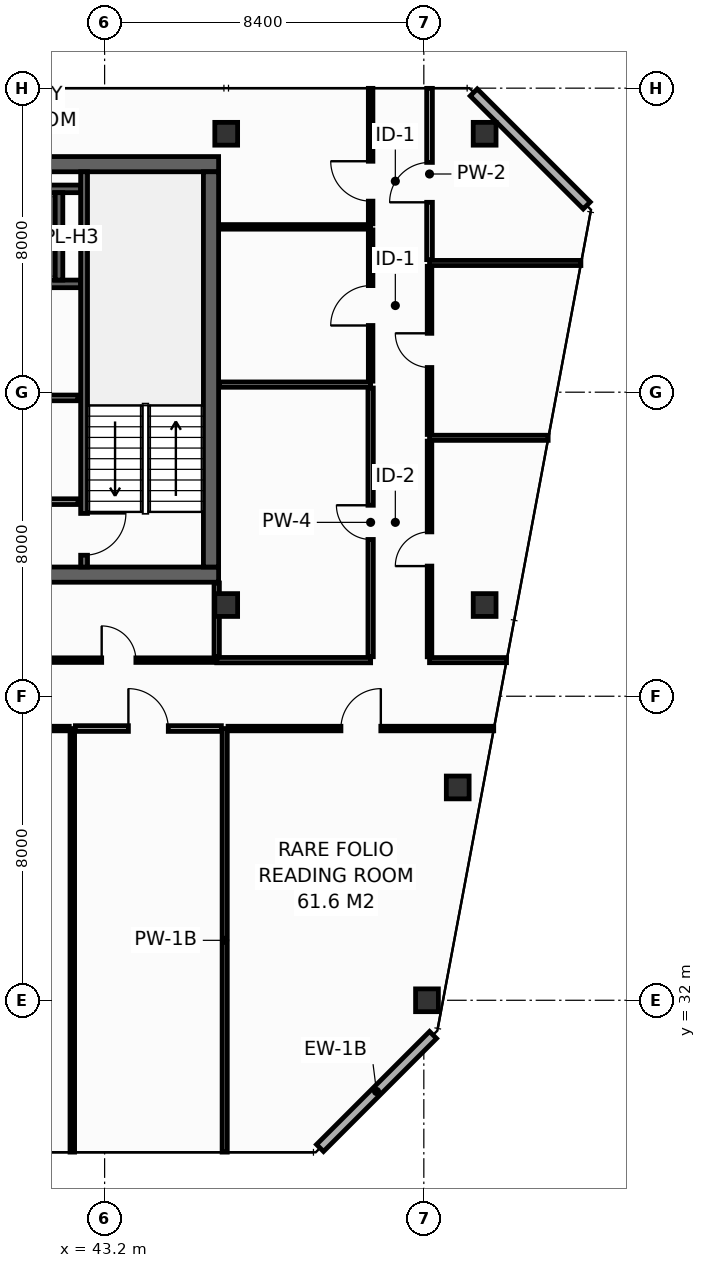
"""IFC4 building model, lengths in metres.
Left out: names, types, materials, properties, quantities, classifications, styles, units other than length and angle.
Written with IfcOpenShell. Run it as: python <this file> out.ifc"""

import sys

from ifc_helpers import new_model, si_unit, direction, frame, frame_2d, origin, origin_2d, place, context, subcontext, project, spatial, rectangle, hollow_rectangle, extrude, element, fill, save


model = new_model("IFC4")
c1 = context("Model", 3, precision=1e-05, world=origin(), true_north=direction((0.0, 1.0)))
c2 = subcontext(c1, "Body", "Model", "MODEL_VIEW")
j1 = project(units=[si_unit("LENGTHUNIT", "METRE"), si_unit("PLANEANGLEUNIT", "RADIAN")], contexts=[c1])
p1 = place(None, origin())
s1 = spatial("IfcSite", under=j1, at=p1, CompositionType="ELEMENT")
p2 = place(p1, origin())
s2 = spatial("IfcBuilding", under=s1, at=p2, CompositionType="ELEMENT")
p3 = place(p2, frame((0.0, 0.0, 280.0)))
s3 = spatial("IfcBuildingStorey", under=s2, at=p3, CompositionType="ELEMENT", Elevation=280.0)
p4 = place(p3, frame((13.7, 43.2, 0.0), z_axis=(0.0, 0.0, 1.0), x_axis=(1.0, 0.0, 0.0)))
e1 = element("IfcWall", 1, at=p4, inside=s3, PredefinedType="SHEAR", context=c2, shape_type="SweptSolid", body=[
    extrude(rectangle(XDim=32.5, YDim=0.4, at=frame_2d((16.25, 0.0))), origin(), (0.0, 0.0, 1.0), 3.55),
])
p5 = place(p4, frame((5.4, 0.0, 0.0)))
e2 = element("IfcOpeningElement", 2, at=p5, cuts=e1, PredefinedType="OPENING", context=c2, shape_type="SweptSolid", body=[
    extrude(rectangle(XDim=1.1, YDim=2.15, at=frame_2d((0.55, 1.075))), frame((0.0, 0.21, 0.0), z_axis=(0.0, -1.0, 0.0), x_axis=(1.0, 0.0, 0.0)), (0.0, 0.0, 1.0), 0.42),
])
p6 = place(p4, frame((25.6, 0.0, 0.0)))
e3 = element("IfcOpeningElement", 3, at=p6, cuts=e1, PredefinedType="OPENING", context=c2, shape_type="SweptSolid", body=[
    extrude(rectangle(XDim=1.1, YDim=2.15, at=frame_2d((0.55, 1.075))), frame((0.0, 0.21, 0.0), z_axis=(0.0, -1.0, 0.0), x_axis=(1.0, 0.0, 0.0)), (0.0, 0.0, 1.0), 0.42),
])
p7 = place(p3, frame((13.7, 54.0, 0.0), z_axis=(0.0, 0.0, 1.0), x_axis=(1.0, 0.0, 0.0)))
e4 = element("IfcWall", 4, at=p7, inside=s3, PredefinedType="SHEAR", context=c2, shape_type="SweptSolid", body=[
    extrude(rectangle(XDim=32.5, YDim=0.4, at=frame_2d((16.25, 0.0))), origin(), (0.0, 0.0, 1.0), 3.55),
])
p8 = place(p3, frame((46.0, 43.4, 0.0), z_axis=(0.0, 0.0, 1.0), x_axis=(0.0, 1.0, 0.0)))
e5 = element("IfcWall", 5, at=p8, inside=s3, PredefinedType="SHEAR", context=c2, shape_type="SweptSolid", body=[
    extrude(rectangle(XDim=10.4, YDim=0.4, at=frame_2d((5.2, 0.0))), origin(), (0.0, 0.0, 1.0), 3.55),
])
for number, where, z_axis, x_axis in (
    (6, (46.4, 54.8, 0.0), (0.0, 0.0, 1.0), (1.0, 0.0, 0.0)),
    (7, (53.2, 54.8, 0.0), (0.0, 0.0, 1.0), (1.0, 0.0, 0.0)),
    (8, (46.4, 42.4, 0.0), (0.0, 0.0, 1.0), (1.0, 0.0, 0.0)),
    (9, (53.2, 42.4, 0.0), (0.0, 0.0, 1.0), (1.0, 0.0, 0.0)),
    (10, (51.683, 32.0, 0.0), (0.0, 0.0, 1.0), (1.0, 0.0, 0.0)),
    (11, (52.492, 37.6, 0.0), (0.0, 0.0, 1.0), (1.0, 0.0, 0.0)),
):
    element("IfcColumn", number, at=place(p3, frame(where, z_axis=z_axis, x_axis=x_axis)), inside=s3, PredefinedType="COLUMN", context=c2, shape_type="SweptSolid", body=[
        extrude(hollow_rectangle(XDim=0.6, YDim=0.6, WallThickness=0.028, at=origin_2d()), origin(), (0.0, 0.0, 1.0), 3.8),
    ])
p9 = place(p3, frame((39.525, 50.85, 0.0), z_axis=(0.0, 0.0, 1.0), x_axis=(1.0, 0.0, 0.0)))
e12 = element("IfcWall", 12, at=p9, inside=s3, PredefinedType="SHEAR", context=c2, shape_type="SweptSolid", body=[
    extrude(rectangle(XDim=3.045, YDim=0.2, at=frame_2d((1.522, 0.0))), origin(), (0.0, 0.0, 1.0), 3.55),
])
p10 = place(p9, frame((0.825, 0.0, 0.0)))
e13 = element("IfcOpeningElement", 13, at=p10, cuts=e12, PredefinedType="OPENING", context=c2, shape_type="SweptSolid", body=[
    extrude(rectangle(XDim=1.1, YDim=2.2, at=frame_2d((0.55, 1.1))), frame((0.0, 0.11, 0.0), z_axis=(0.0, -1.0, 0.0), x_axis=(1.0, 0.0, 0.0)), (0.0, 0.0, 1.0), 0.22),
])
p11 = place(p3, frame((39.525, 53.35, 0.0), z_axis=(0.0, 0.0, 1.0), x_axis=(1.0, 0.0, 0.0)))
e14 = element("IfcWall", 14, at=p11, inside=s3, PredefinedType="SHEAR", context=c2, shape_type="SweptSolid", body=[
    extrude(rectangle(XDim=3.045, YDim=0.2, at=frame_2d((1.522, 0.0))), origin(), (0.0, 0.0, 1.0), 3.55),
])
p12 = place(p3, frame((42.0, 50.95, 0.0), z_axis=(0.0, 0.0, 1.0), x_axis=(0.0, 1.0, 0.0)))
e15 = element("IfcWall", 15, at=p12, inside=s3, PredefinedType="SHEAR", context=c2, shape_type="SweptSolid", body=[
    extrude(rectangle(XDim=2.3, YDim=0.2, at=frame_2d((1.15, 0.0))), origin(), (0.0, 0.0, 1.0), 3.55),
])
p13 = place(p3, frame((42.66, 53.8, 0.0), z_axis=(0.0, 0.0, 1.0), x_axis=(0.0, -1.0, 0.0)))
e16 = element("IfcWall", 16, at=p13, inside=s3, PredefinedType="SHEAR", context=c2, shape_type="SweptSolid", body=[
    extrude(rectangle(XDim=10.4, YDim=0.18, at=frame_2d((5.2, 0.0))), origin(), (0.0, 0.0, 1.0), 3.55),
])
p14 = place(p13, frame((8.99, 0.0, 0.0)))
e17 = element("IfcOpeningElement", 17, at=p14, cuts=e16, PredefinedType="OPENING", context=c2, shape_type="SweptSolid", body=[
    extrude(rectangle(XDim=1.1, YDim=2.15, at=frame_2d((0.55, 1.075))), frame((0.0, 0.1, 0.0), z_axis=(0.0, -1.0, 0.0), x_axis=(1.0, 0.0, 0.0)), (0.0, 0.0, 1.0), 0.2),
])
p15 = place(p3, frame((34.05, 45.12, 0.0), z_axis=(0.0, 0.0, 1.0), x_axis=(1.0, 0.0, 0.0)))
e18 = element("IfcWall", 18, at=p15, inside=s3, PredefinedType="PARTITIONING", context=c2, shape_type="SweptSolid", body=[
    extrude(rectangle(XDim=8.45, YDim=0.15, at=frame_2d((4.225, 0.0))), origin(), (0.0, 0.0, 1.0), 3.55),
])
p16 = place(p15, frame((1.5, 0.0, 0.0)))
e19 = element("IfcOpeningElement", 19, at=p16, cuts=e18, PredefinedType="OPENING", context=c2, shape_type="SweptSolid", body=[
    extrude(rectangle(XDim=0.95, YDim=2.15, at=frame_2d((0.475, 1.075))), frame((0.0, 0.085, 0.0), z_axis=(0.0, -1.0, 0.0), x_axis=(1.0, 0.0, 0.0)), (0.0, 0.0, 1.0), 0.17),
])
p17 = place(p15, frame((5.8, 0.0, 0.0)))
e20 = element("IfcOpeningElement", 20, at=p17, cuts=e18, PredefinedType="OPENING", context=c2, shape_type="SweptSolid", body=[
    extrude(rectangle(XDim=0.95, YDim=2.15, at=frame_2d((0.475, 1.075))), frame((0.0, 0.085, 0.0), z_axis=(0.0, -1.0, 0.0), x_axis=(1.0, 0.0, 0.0)), (0.0, 0.0, 1.0), 0.17),
])
p18 = place(p3, frame((34.05, 47.85, 0.0), z_axis=(0.0, 0.0, 1.0), x_axis=(1.0, 0.0, 0.0)))
e21 = element("IfcWall", 21, at=p18, inside=s3, PredefinedType="PARTITIONING", context=c2, shape_type="SweptSolid", body=[
    extrude(rectangle(XDim=8.45, YDim=0.15, at=frame_2d((4.225, 0.0))), origin(), (0.0, 0.0, 1.0), 3.55),
])
for number, where, z_axis, x_axis in (
    (22, (48.869, 28.113, 0.0), (0.0, 0.0, 1.0), (0.707, 0.707, 0.0)),
    (23, (55.887, 52.913, 0.0), (0.0, 0.0, 1.0), (-0.707, 0.707, 0.0)),
):
    element("IfcWall", number, at=place(p3, frame(where, z_axis=z_axis, x_axis=x_axis)), inside=s3, PredefinedType="STANDARD", context=c2, shape_type="SweptSolid", body=[
        extrude(rectangle(XDim=4.206, YDim=0.26, at=frame_2d((2.103, 0.0))), origin(), (0.0, 0.0, 1.0), 3.55),
    ])
p19 = place(p3, frame((46.15, 40.95, 0.0), z_axis=(0.0, 0.0, 1.0), x_axis=(1.0, 0.0, 0.0)))
e24 = element("IfcWall", 24, at=p19, inside=s3, PredefinedType="PARTITIONING", context=c2, shape_type="SweptSolid", body=[
    extrude(rectangle(XDim=4.05, YDim=0.14, at=frame_2d((2.025, 0.0))), origin(), (0.0, 0.0, 1.0), 3.55),
])
p20 = place(p3, frame((46.15, 41.04, 0.0), z_axis=(0.0, 0.0, 1.0), x_axis=(0.0, 1.0, 0.0)))
e25 = element("IfcWall", 25, at=p20, inside=s3, PredefinedType="PARTITIONING", context=c2, shape_type="SweptSolid", body=[
    extrude(rectangle(XDim=1.94, YDim=0.14, at=frame_2d((0.97, 0.0))), origin(), (0.0, 0.0, 1.0), 3.55),
])
p21 = place(p3, frame((46.22, 48.2, 0.0), z_axis=(0.0, 0.0, 1.0), x_axis=(1.0, 0.0, 0.0)))
e26 = element("IfcWall", 26, at=p21, inside=s3, PredefinedType="PARTITIONING", context=c2, shape_type="SweptSolid", body=[
    extrude(rectangle(XDim=3.98, YDim=0.14, at=frame_2d((1.99, 0.0))), origin(), (0.0, 0.0, 1.0), 3.55),
])
p22 = place(p3, frame((50.2, 41.04, 0.0), z_axis=(0.0, 0.0, 1.0), x_axis=(0.0, 1.0, 0.0)))
e27 = element("IfcWall", 27, at=p22, inside=s3, PredefinedType="PARTITIONING", context=c2, shape_type="SweptSolid", body=[
    extrude(rectangle(XDim=7.07, YDim=0.14, at=frame_2d((3.535, 0.0))), origin(), (0.0, 0.0, 1.0), 2.947),
])
p23 = place(p22, frame((3.085, 0.0, 0.0)))
e28 = element("IfcOpeningElement", 28, at=p23, cuts=e27, PredefinedType="OPENING", context=c2, shape_type="SweptSolid", body=[
    extrude(rectangle(XDim=0.9, YDim=2.1, at=frame_2d((0.45, 1.05))), frame((0.0, 0.08, 0.0), z_axis=(0.0, -1.0, 0.0), x_axis=(1.0, 0.0, 0.0)), (0.0, 0.0, 1.0), 0.16),
])
p24 = place(p3, frame((46.22, 52.35, 0.0), z_axis=(0.0, 0.0, 1.0), x_axis=(1.0, 0.0, 0.0)))
e29 = element("IfcWall", 29, at=p24, inside=s3, PredefinedType="PARTITIONING", context=c2, shape_type="SweptSolid", body=[
    extrude(rectangle(XDim=3.98, YDim=0.12, at=frame_2d((1.99, 0.0))), origin(), (0.0, 0.0, 1.0), 3.55),
])
p25 = place(p3, frame((50.2, 48.29, 0.0), z_axis=(0.0, 0.0, 1.0), x_axis=(0.0, 1.0, 0.0)))
e30 = element("IfcWall", 30, at=p25, inside=s3, PredefinedType="PARTITIONING", context=c2, shape_type="SweptSolid", body=[
    extrude(rectangle(XDim=3.98, YDim=0.12, at=frame_2d((1.99, 0.0))), origin(), (0.0, 0.0, 1.0), 3.55),
])
p26 = place(p25, frame((1.465, 0.0, 0.0)))
e31 = element("IfcOpeningElement", 31, at=p26, cuts=e30, PredefinedType="OPENING", context=c2, shape_type="SweptSolid", body=[
    extrude(rectangle(XDim=1.05, YDim=2.15, at=frame_2d((0.525, 1.075))), frame((0.0, 0.07, 0.0), z_axis=(0.0, -1.0, 0.0), x_axis=(1.0, 0.0, 0.0)), (0.0, 0.0, 1.0), 0.14),
])
p27 = place(p3, frame((50.2, 52.43, 0.0), z_axis=(0.0, 0.0, 1.0), x_axis=(0.0, 1.0, 0.0)))
e32 = element("IfcWall", 32, at=p27, inside=s3, PredefinedType="PARTITIONING", context=c2, shape_type="SweptSolid", body=[
    extrude(rectangle(XDim=3.565, YDim=0.12, at=frame_2d((1.783, 0.0))), origin(), (0.0, 0.0, 1.0), 2.935),
])
p28 = place(p27, frame((0.597, 0.0, 0.0)))
e33 = element("IfcOpeningElement", 33, at=p28, cuts=e32, PredefinedType="OPENING", context=c2, shape_type="SweptSolid", body=[
    extrude(rectangle(XDim=1.05, YDim=2.15, at=frame_2d((0.525, 1.075))), frame((0.0, 0.07, 0.0), z_axis=(0.0, -1.0, 0.0), x_axis=(1.0, 0.0, 0.0)), (0.0, 0.0, 1.0), 0.14),
])
p29 = place(p3, frame((51.75, 40.95, 0.0), z_axis=(0.0, 0.0, 1.0), x_axis=(1.0, 0.0, 0.0)))
e34 = element("IfcWall", 34, at=p29, inside=s3, PredefinedType="PARTITIONING", context=c2, shape_type="SweptSolid", body=[
    extrude(rectangle(XDim=2.026, YDim=0.135, at=frame_2d((1.013, 0.0))), origin(), (0.0, 0.0, 1.0), 3.085),
])
p30 = place(p3, frame((51.75, 46.8, 0.0), z_axis=(0.0, 0.0, 1.0), x_axis=(1.0, 0.0, 0.0)))
e35 = element("IfcWall", 35, at=p30, inside=s3, PredefinedType="PARTITIONING", context=c2, shape_type="SweptSolid", body=[
    extrude(rectangle(XDim=3.122, YDim=0.135, at=frame_2d((1.561, 0.0))), origin(), (0.0, 0.0, 1.0), 2.947),
])
p31 = place(p3, frame((51.75, 51.4, 0.0), z_axis=(0.0, 0.0, 1.0), x_axis=(1.0, 0.0, 0.0)))
e36 = element("IfcWall", 36, at=p31, inside=s3, PredefinedType="PARTITIONING", context=c2, shape_type="SweptSolid", body=[
    extrude(rectangle(XDim=3.983, YDim=0.135, at=frame_2d((1.991, 0.0))), origin(), (0.0, 0.0, 1.0), 2.947),
])
p32 = place(p3, frame((51.75, 41.038, 0.0), z_axis=(0.0, 0.0, 1.0), x_axis=(0.0, 1.0, 0.0)))
e37 = element("IfcWall", 37, at=p32, inside=s3, PredefinedType="PARTITIONING", context=c2, shape_type="SweptSolid", body=[
    extrude(rectangle(XDim=5.675, YDim=0.12, at=frame_2d((2.837, 0.0))), origin(), (0.0, 0.0, 1.0), 2.947),
])
p33 = place(p32, frame((2.387, 0.0, 0.0)))
e38 = element("IfcOpeningElement", 38, at=p33, cuts=e37, PredefinedType="OPENING", context=c2, shape_type="SweptSolid", body=[
    extrude(rectangle(XDim=0.9, YDim=2.1, at=frame_2d((0.45, 1.05))), frame((0.0, 0.07, 0.0), z_axis=(0.0, -1.0, 0.0), x_axis=(1.0, 0.0, 0.0)), (0.0, 0.0, 1.0), 0.14),
])
p34 = place(p3, frame((51.75, 46.887, 0.0), z_axis=(0.0, 0.0, 1.0), x_axis=(0.0, 1.0, 0.0)))
e39 = element("IfcWall", 39, at=p34, inside=s3, PredefinedType="PARTITIONING", context=c2, shape_type="SweptSolid", body=[
    extrude(rectangle(XDim=4.425, YDim=0.12, at=frame_2d((2.212, 0.0))), origin(), (0.0, 0.0, 1.0), 3.55),
])
p35 = place(p34, frame((1.762, 0.0, 0.0)))
e40 = element("IfcOpeningElement", 40, at=p35, cuts=e39, PredefinedType="OPENING", context=c2, shape_type="SweptSolid", body=[
    extrude(rectangle(XDim=0.9, YDim=2.1, at=frame_2d((0.45, 1.05))), frame((0.0, 0.07, 0.0), z_axis=(0.0, -1.0, 0.0), x_axis=(1.0, 0.0, 0.0)), (0.0, 0.0, 1.0), 0.14),
])
p36 = place(p3, frame((51.75, 51.488, 0.0), z_axis=(0.0, 0.0, 1.0), x_axis=(0.0, 1.0, 0.0)))
e41 = element("IfcWall", 41, at=p36, inside=s3, PredefinedType="PARTITIONING", context=c2, shape_type="SweptSolid", body=[
    extrude(rectangle(XDim=4.508, YDim=0.15, at=frame_2d((2.254, 0.0))), origin(), (0.0, 0.0, 1.0), 2.935),
])
p37 = place(p36, frame((1.509, 0.0, 0.0)))
e42 = element("IfcOpeningElement", 42, at=p37, cuts=e41, PredefinedType="OPENING", context=c2, shape_type="SweptSolid", body=[
    extrude(rectangle(XDim=1.05, YDim=2.15, at=frame_2d((0.525, 1.075))), frame((0.0, 0.085, 0.0), z_axis=(0.0, -1.0, 0.0), x_axis=(1.0, 0.0, 0.0)), (0.0, 0.0, 1.0), 0.17),
])
p38 = place(p3, frame((40.995, 40.95, 0.0), z_axis=(0.0, 0.0, 1.0), x_axis=(1.0, 0.0, 0.0)))
e43 = element("IfcWall", 43, at=p38, inside=s3, PredefinedType="PARTITIONING", context=c2, shape_type="SweptSolid", body=[
    extrude(rectangle(XDim=5.155, YDim=0.12, at=frame_2d((2.577, 0.0))), origin(), (0.0, 0.0, 1.0), 3.55),
])
p39 = place(p38, frame((2.128, 0.0, 0.0)))
e44 = element("IfcOpeningElement", 44, at=p39, cuts=e43, PredefinedType="OPENING", context=c2, shape_type="SweptSolid", body=[
    extrude(rectangle(XDim=0.9, YDim=2.1, at=frame_2d((0.45, 1.05))), frame((0.0, 0.07, 0.0), z_axis=(0.0, -1.0, 0.0), x_axis=(1.0, 0.0, 0.0)), (0.0, 0.0, 1.0), 0.14),
])
p40 = place(p3, frame((42.35, 28.005, 0.0), z_axis=(0.0, 0.0, 1.0), x_axis=(0.0, 1.0, 0.0)))
e45 = element("IfcWall", 45, at=p40, inside=s3, PredefinedType="PARTITIONING", context=c2, shape_type="SweptSolid", body=[
    extrude(rectangle(XDim=11.145, YDim=0.12, at=frame_2d((5.573, 0.0))), origin(), (0.0, 0.0, 1.0), 3.047),
])
p41 = place(p3, frame((46.36, 28.005, 0.0), z_axis=(0.0, 0.0, 1.0), x_axis=(0.0, 1.0, 0.0)))
e46 = element("IfcWall", 46, at=p41, inside=s3, PredefinedType="PARTITIONING", context=c2, shape_type="SweptSolid", body=[
    extrude(rectangle(XDim=11.145, YDim=0.135, at=frame_2d((5.573, 0.0))), origin(), (0.0, 0.0, 1.0), 3.047),
])
p42 = place(p3, frame((35.758, 39.15, 0.0), z_axis=(0.0, 0.0, 1.0), x_axis=(1.0, 0.0, 0.0)))
e47 = element("IfcWall", 47, at=p42, inside=s3, PredefinedType="PARTITIONING", context=c2, shape_type="SweptSolid", body=[
    extrude(rectangle(XDim=6.512, YDim=0.12, at=frame_2d((3.256, 0.0))), origin(), (0.0, 0.0, 1.0), 3.047),
])
p43 = place(p42, frame((2.806, 0.0, 0.0)))
e48 = element("IfcOpeningElement", 48, at=p43, cuts=e47, PredefinedType="OPENING", context=c2, shape_type="SweptSolid", body=[
    extrude(rectangle(XDim=0.9, YDim=2.1, at=frame_2d((0.45, 1.05))), frame((0.0, 0.07, 0.0), z_axis=(0.0, -1.0, 0.0), x_axis=(1.0, 0.0, 0.0)), (0.0, 0.0, 1.0), 0.14),
])
p44 = place(p3, frame((42.43, 39.15, 0.0), z_axis=(0.0, 0.0, 1.0), x_axis=(1.0, 0.0, 0.0)))
e49 = element("IfcWall", 49, at=p44, inside=s3, PredefinedType="PARTITIONING", context=c2, shape_type="SweptSolid", body=[
    extrude(rectangle(XDim=3.843, YDim=0.15, at=frame_2d((1.921, 0.0))), origin(), (0.0, 0.0, 1.0), 3.55),
])
p45 = place(p44, frame((1.396, 0.0, 0.0)))
e50 = element("IfcOpeningElement", 50, at=p45, cuts=e49, PredefinedType="OPENING", context=c2, shape_type="SweptSolid", body=[
    extrude(rectangle(XDim=1.05, YDim=2.15, at=frame_2d((0.525, 1.075))), frame((0.0, 0.085, 0.0), z_axis=(0.0, -1.0, 0.0), x_axis=(1.0, 0.0, 0.0)), (0.0, 0.0, 1.0), 0.17),
])
p46 = place(p3, frame((46.448, 39.15, 0.0), z_axis=(0.0, 0.0, 1.0), x_axis=(1.0, 0.0, 0.0)))
e51 = element("IfcWall", 51, at=p46, inside=s3, PredefinedType="PARTITIONING", context=c2, shape_type="SweptSolid", body=[
    extrude(rectangle(XDim=6.992, YDim=0.12, at=frame_2d((3.496, 0.0))), origin(), (0.0, 0.0, 1.0), 3.085),
])
p47 = place(p46, frame((2.971, 0.0, 0.0)))
e52 = element("IfcOpeningElement", 52, at=p47, cuts=e51, PredefinedType="OPENING", context=c2, shape_type="SweptSolid", body=[
    extrude(rectangle(XDim=1.05, YDim=2.15, at=frame_2d((0.525, 1.075))), frame((0.0, 0.07, 0.0), z_axis=(0.0, -1.0, 0.0), x_axis=(1.0, 0.0, 0.0)), (0.0, 0.0, 1.0), 0.14),
])
p48 = place(p14, origin())
e53 = element("IfcDoor", 53, at=p48, inside=s3, OperationType="SINGLE_SWING_LEFT", PredefinedType="DOOR", context=c2, shape_type="SweptSolid", body=[
    extrude(rectangle(XDim=1.1, YDim=2.15, at=frame_2d((0.55, 1.075))), frame((0.0, 0.025, 0.0), z_axis=(0.0, -1.0, 0.0), x_axis=(1.0, 0.0, 0.0)), (0.0, 0.0, 1.0), 0.05),
])
fill(e17, e53)
p49 = place(p23, origin())
e54 = element("IfcDoor", 54, at=p49, inside=s3, OperationType="SINGLE_SWING_RIGHT", PredefinedType="DOOR", context=c2, shape_type="SweptSolid", body=[
    extrude(rectangle(XDim=0.9, YDim=2.1, at=frame_2d((0.45, 1.05))), frame((0.0, 0.025, 0.0), z_axis=(0.0, -1.0, 0.0), x_axis=(1.0, 0.0, 0.0)), (0.0, 0.0, 1.0), 0.05),
])
fill(e28, e54)
p50 = place(p26, origin())
e55 = element("IfcDoor", 55, at=p50, inside=s3, OperationType="SINGLE_SWING_LEFT", PredefinedType="DOOR", context=c2, shape_type="SweptSolid", body=[
    extrude(rectangle(XDim=1.05, YDim=2.15, at=frame_2d((0.525, 1.075))), frame((0.0, 0.025, 0.0), z_axis=(0.0, -1.0, 0.0), x_axis=(1.0, 0.0, 0.0)), (0.0, 0.0, 1.0), 0.05),
])
fill(e31, e55)
p51 = place(p28, origin())
e56 = element("IfcDoor", 56, at=p51, inside=s3, OperationType="SINGLE_SWING_RIGHT", PredefinedType="DOOR", context=c2, shape_type="SweptSolid", body=[
    extrude(rectangle(XDim=1.05, YDim=2.15, at=frame_2d((0.525, 1.075))), frame((0.0, 0.025, 0.0), z_axis=(0.0, -1.0, 0.0), x_axis=(1.0, 0.0, 0.0)), (0.0, 0.0, 1.0), 0.05),
])
fill(e33, e56)
p52 = place(p33, origin())
e57 = element("IfcDoor", 57, at=p52, inside=s3, OperationType="SINGLE_SWING_LEFT", PredefinedType="DOOR", context=c2, shape_type="SweptSolid", body=[
    extrude(rectangle(XDim=0.9, YDim=2.1, at=frame_2d((0.45, 1.05))), frame((0.0, 0.025, 0.0), z_axis=(0.0, -1.0, 0.0), x_axis=(1.0, 0.0, 0.0)), (0.0, 0.0, 1.0), 0.05),
])
fill(e38, e57)
p53 = place(p35, origin())
e58 = element("IfcDoor", 58, at=p53, inside=s3, OperationType="SINGLE_SWING_RIGHT", PredefinedType="DOOR", context=c2, shape_type="SweptSolid", body=[
    extrude(rectangle(XDim=0.9, YDim=2.1, at=frame_2d((0.45, 1.05))), frame((0.0, 0.025, 0.0), z_axis=(0.0, -1.0, 0.0), x_axis=(1.0, 0.0, 0.0)), (0.0, 0.0, 1.0), 0.05),
])
fill(e40, e58)
p54 = place(p37, origin())
e59 = element("IfcDoor", 59, at=p54, inside=s3, OperationType="SINGLE_SWING_LEFT", PredefinedType="DOOR", context=c2, shape_type="SweptSolid", body=[
    extrude(rectangle(XDim=1.05, YDim=2.15, at=frame_2d((0.525, 1.075))), frame((0.0, 0.025, 0.0), z_axis=(0.0, -1.0, 0.0), x_axis=(1.0, 0.0, 0.0)), (0.0, 0.0, 1.0), 0.05),
])
fill(e42, e59)
p55 = place(p39, origin())
e60 = element("IfcDoor", 60, at=p55, inside=s3, OperationType="SINGLE_SWING_LEFT", PredefinedType="DOOR", context=c2, shape_type="SweptSolid", body=[
    extrude(rectangle(XDim=0.9, YDim=2.1, at=frame_2d((0.45, 1.05))), frame((0.0, 0.025, 0.0), z_axis=(0.0, -1.0, 0.0), x_axis=(1.0, 0.0, 0.0)), (0.0, 0.0, 1.0), 0.05),
])
fill(e44, e60)
p56 = place(p45, origin())
e61 = element("IfcDoor", 61, at=p56, inside=s3, OperationType="SINGLE_SWING_LEFT", PredefinedType="DOOR", context=c2, shape_type="SweptSolid", body=[
    extrude(rectangle(XDim=1.05, YDim=2.15, at=frame_2d((0.525, 1.075))), frame((0.0, 0.025, 0.0), z_axis=(0.0, -1.0, 0.0), x_axis=(1.0, 0.0, 0.0)), (0.0, 0.0, 1.0), 0.05),
])
fill(e50, e61)
p57 = place(p47, origin())
e62 = element("IfcDoor", 62, at=p57, inside=s3, OperationType="SINGLE_SWING_RIGHT", PredefinedType="DOOR", context=c2, shape_type="SweptSolid", body=[
    extrude(rectangle(XDim=1.05, YDim=2.15, at=frame_2d((0.525, 1.075))), frame((0.0, 0.025, 0.0), z_axis=(0.0, -1.0, 0.0), x_axis=(1.0, 0.0, 0.0)), (0.0, 0.0, 1.0), 0.05),
])
fill(e52, e62)
save(model, sys.argv[1])
